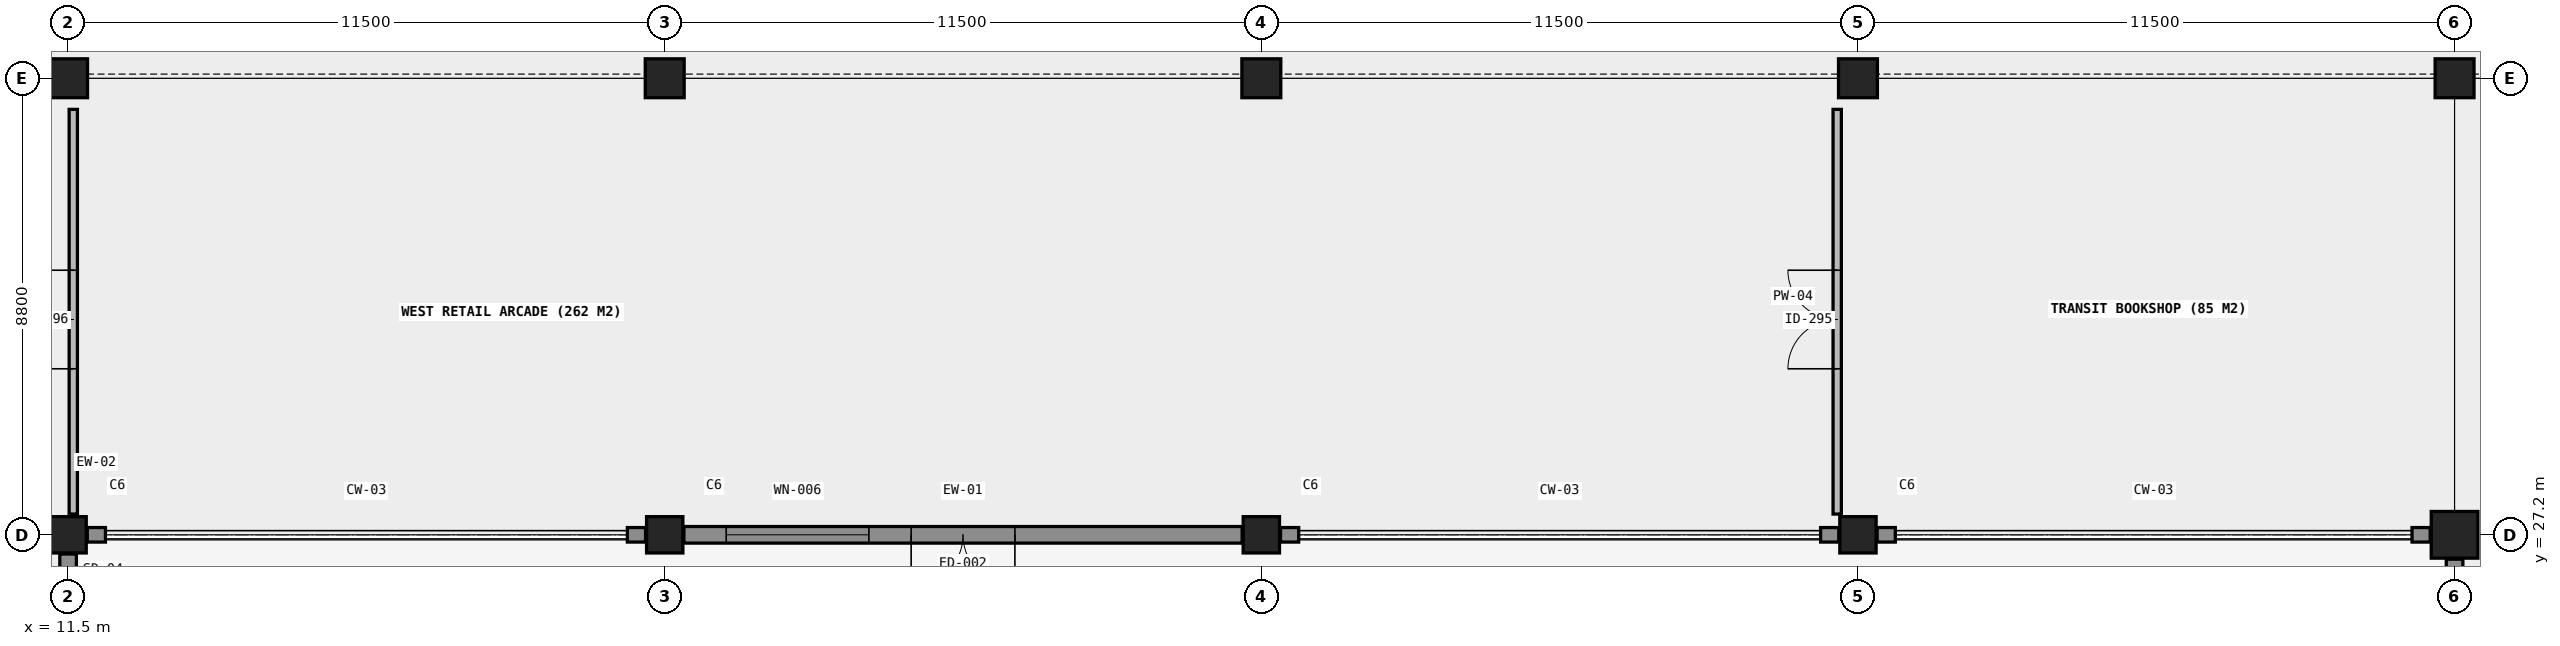
"""IFC4 building model, lengths in metres.
Left out: names, types, materials, properties, quantities, classifications, styles, units other than length and angle.
Written with IfcOpenShell. Run it as: python <this file> out.ifc"""

import sys

from ifc_helpers import new_model, si_unit, direction, frame, frame_2d, origin, origin_2d, place, context, subcontext, project, spatial, rectangle, circle, extrude, element, fill, save


model = new_model("IFC4")
c1 = context("Model", 3, precision=1e-05, world=origin(), true_north=direction((0.0, 1.0)))
c2 = subcontext(c1, "Body", "Model", "MODEL_VIEW")
j1 = project(units=[si_unit("LENGTHUNIT", "METRE"), si_unit("PLANEANGLEUNIT", "RADIAN")], contexts=[c1])
p1 = place(None, origin())
s1 = spatial("IfcSite", under=j1, at=p1, CompositionType="ELEMENT")
p2 = place(p1, origin())
s2 = spatial("IfcBuilding", under=s1, at=p2, CompositionType="ELEMENT")
p3 = place(p2, origin())
s3 = spatial("IfcBuildingStorey", under=s2, at=p3, CompositionType="ELEMENT", Elevation=0.0)
p4 = place(p3, frame((11.5, 27.2, 0.0), z_axis=(0.0, 0.0, 1.0), x_axis=(1.0, 0.0, 0.0)))
e1 = element("IfcColumn", 1, at=p4, inside=s3, PredefinedType="COLUMN", context=c2, shape_type="SweptSolid", body=[
    extrude(rectangle(XDim=0.7, YDim=0.7, at=origin_2d()), origin(), (0.0, 0.0, 1.0), 4.2),
])
p5 = place(p3, frame((11.5, 36.0, 0.0), z_axis=(0.0, 0.0, 1.0), x_axis=(1.0, 0.0, 0.0)))
e2 = element("IfcColumn", 2, at=p5, inside=s3, PredefinedType="COLUMN", context=c2, shape_type="SweptSolid", body=[
    extrude(rectangle(XDim=0.75, YDim=0.75, at=origin_2d()), origin(), (0.0, 0.0, 1.0), 4.2),
])
p6 = place(p3, frame((23.0, 27.2, 0.0), z_axis=(0.0, 0.0, 1.0), x_axis=(1.0, 0.0, 0.0)))
e3 = element("IfcColumn", 3, at=p6, inside=s3, PredefinedType="COLUMN", context=c2, shape_type="SweptSolid", body=[
    extrude(rectangle(XDim=0.7, YDim=0.7, at=origin_2d()), origin(), (0.0, 0.0, 1.0), 4.2),
])
p7 = place(p3, frame((23.0, 36.0, 0.0), z_axis=(0.0, 0.0, 1.0), x_axis=(1.0, 0.0, 0.0)))
e4 = element("IfcColumn", 4, at=p7, inside=s3, PredefinedType="COLUMN", context=c2, shape_type="SweptSolid", body=[
    extrude(rectangle(XDim=0.75, YDim=0.75, at=origin_2d()), origin(), (0.0, 0.0, 1.0), 4.2),
])
p8 = place(p3, frame((34.5, 27.2, 0.0), z_axis=(0.0, 0.0, 1.0), x_axis=(1.0, 0.0, 0.0)))
e5 = element("IfcColumn", 5, at=p8, inside=s3, PredefinedType="COLUMN", context=c2, shape_type="SweptSolid", body=[
    extrude(rectangle(XDim=0.7, YDim=0.7, at=origin_2d()), origin(), (0.0, 0.0, 1.0), 4.2),
])
p9 = place(p3, frame((34.5, 36.0, 0.0), z_axis=(0.0, 0.0, 1.0), x_axis=(1.0, 0.0, 0.0)))
e6 = element("IfcColumn", 6, at=p9, inside=s3, PredefinedType="COLUMN", context=c2, shape_type="SweptSolid", body=[
    extrude(rectangle(XDim=0.75, YDim=0.75, at=origin_2d()), origin(), (0.0, 0.0, 1.0), 4.2),
])
p10 = place(p3, frame((46.0, 27.2, 0.0), z_axis=(0.0, 0.0, 1.0), x_axis=(1.0, 0.0, 0.0)))
e7 = element("IfcColumn", 7, at=p10, inside=s3, PredefinedType="COLUMN", context=c2, shape_type="SweptSolid", body=[
    extrude(rectangle(XDim=0.7, YDim=0.7, at=origin_2d()), origin(), (0.0, 0.0, 1.0), 4.2),
])
p11 = place(p3, frame((46.0, 36.0, 0.0), z_axis=(0.0, 0.0, 1.0), x_axis=(1.0, 0.0, 0.0)))
e8 = element("IfcColumn", 8, at=p11, inside=s3, PredefinedType="COLUMN", context=c2, shape_type="SweptSolid", body=[
    extrude(rectangle(XDim=0.75, YDim=0.75, at=origin_2d()), origin(), (0.0, 0.0, 1.0), 4.2),
])
p12 = place(p3, frame((57.5, 27.2, 0.0), z_axis=(0.0, 0.0, 1.0), x_axis=(1.0, 0.0, 0.0)))
e9 = element("IfcColumn", 9, at=p12, inside=s3, PredefinedType="COLUMN", context=c2, shape_type="SweptSolid", body=[
    extrude(circle(Radius=0.45, at=origin_2d()), origin(), (0.0, 0.0, 1.0), 4.2),
])
p13 = place(p3, frame((57.5, 36.0, 0.0), z_axis=(0.0, 0.0, 1.0), x_axis=(1.0, 0.0, 0.0)))
e10 = element("IfcColumn", 10, at=p13, inside=s3, PredefinedType="COLUMN", context=c2, shape_type="SweptSolid", body=[
    extrude(rectangle(XDim=0.75, YDim=0.75, at=origin_2d()), origin(), (0.0, 0.0, 1.0), 4.2),
])
p14 = place(p3, frame((11.5, 17.97, 0.0), z_axis=(0.0, 0.0, 1.0), x_axis=(0.0, 1.0, 0.0)))
e11 = element("IfcWall", 11, at=p14, inside=s3, PredefinedType="SOLIDWALL", context=c2, shape_type="SweptSolid", body=[
    extrude(rectangle(XDim=8.86, YDim=0.32, at=frame_2d((4.43, 0.0))), origin(), (0.0, 0.0, 1.0), 3.0),
])
p15 = place(p14, frame((1.353, 0.0, 0.84)))
e12 = element("IfcOpeningElement", 12, at=p15, cuts=e11, PredefinedType="OPENING", context=c2, shape_type="SweptSolid", body=[
    extrude(rectangle(XDim=2.4, YDim=2.1, at=frame_2d((1.2, 1.05))), frame((0.0, 0.17, 0.0), z_axis=(0.0, -1.0, 0.0), x_axis=(1.0, 0.0, 0.0)), (0.0, 0.0, 1.0), 0.34),
])
p16 = place(p14, frame((5.107, 0.0, 0.84)))
e13 = element("IfcOpeningElement", 13, at=p16, cuts=e11, PredefinedType="OPENING", context=c2, shape_type="SweptSolid", body=[
    extrude(rectangle(XDim=2.4, YDim=2.1, at=frame_2d((1.2, 1.05))), frame((0.0, 0.17, 0.0), z_axis=(0.0, -1.0, 0.0), x_axis=(1.0, 0.0, 0.0)), (0.0, 0.0, 1.0), 0.34),
])
for number, where, z_axis, x_axis in (
    (14, (11.87, 27.2, 0.0), (0.0, 0.0, 1.0), (1.0, 0.0, 0.0)),
    (15, (22.28, 27.2, 0.0), (0.0, 0.0, 1.0), (1.0, 0.0, 0.0)),
):
    element("IfcWall", number, at=place(p3, frame(where, z_axis=z_axis, x_axis=x_axis)), inside=s3, PredefinedType="SOLIDWALL", context=c2, shape_type="SweptSolid", body=[
        extrude(rectangle(XDim=0.35, YDim=0.28, at=frame_2d((0.175, 0.0))), origin(), (0.0, 0.0, 1.0), 3.88),
    ])
p17 = place(p3, frame((23.37, 27.2, 0.0), z_axis=(0.0, 0.0, 1.0), x_axis=(1.0, 0.0, 0.0)))
e16 = element("IfcWall", 16, at=p17, inside=s3, PredefinedType="SOLIDWALL", context=c2, shape_type="SweptSolid", body=[
    extrude(rectangle(XDim=10.76, YDim=0.32, at=frame_2d((5.38, 0.0))), origin(), (0.0, 0.0, 1.0), 3.0),
])
p18 = place(p17, frame((4.38, 0.0, 0.0)))
e17 = element("IfcOpeningElement", 17, at=p18, cuts=e16, PredefinedType="OPENING", context=c2, shape_type="SweptSolid", body=[
    extrude(rectangle(XDim=2.0, YDim=2.4, at=frame_2d((1.0, 1.2))), frame((0.0, 0.17, 0.0), z_axis=(0.0, -1.0, 0.0), x_axis=(1.0, 0.0, 0.0)), (0.0, 0.0, 1.0), 0.34),
])
p19 = place(p17, frame((0.815, 0.0, 0.78)))
e18 = element("IfcOpeningElement", 18, at=p19, cuts=e16, PredefinedType="OPENING", context=c2, shape_type="SweptSolid", body=[
    extrude(rectangle(XDim=2.75, YDim=2.15, at=frame_2d((1.375, 1.075))), frame((0.0, 0.17, 0.0), z_axis=(0.0, -1.0, 0.0), x_axis=(1.0, 0.0, 0.0)), (0.0, 0.0, 1.0), 0.34),
])
for number, where, z_axis, x_axis in (
    (19, (34.87, 27.2, 0.0), (0.0, 0.0, 1.0), (1.0, 0.0, 0.0)),
    (20, (45.28, 27.2, 0.0), (0.0, 0.0, 1.0), (1.0, 0.0, 0.0)),
    (21, (46.37, 27.2, 0.0), (0.0, 0.0, 1.0), (1.0, 0.0, 0.0)),
):
    element("IfcWall", number, at=place(p3, frame(where, z_axis=z_axis, x_axis=x_axis)), inside=s3, PredefinedType="SOLIDWALL", context=c2, shape_type="SweptSolid", body=[
        extrude(rectangle(XDim=0.35, YDim=0.28, at=frame_2d((0.175, 0.0))), origin(), (0.0, 0.0, 1.0), 3.88),
    ])
p20 = place(p3, frame((56.68, 27.2, 0.0), z_axis=(0.0, 0.0, 1.0), x_axis=(1.0, 0.0, 0.0)))
e22 = element("IfcWall", 22, at=p20, inside=s3, PredefinedType="SOLIDWALL", context=c2, shape_type="SweptSolid", body=[
    extrude(rectangle(XDim=0.35, YDim=0.28, at=frame_2d((0.175, 0.0))), origin(), (0.0, 0.0, 1.0), 3.88),
])
p21 = place(p3, frame((57.5, 18.07, 0.0), z_axis=(0.0, 0.0, 1.0), x_axis=(0.0, 1.0, 0.0)))
e23 = element("IfcWall", 23, at=p21, inside=s3, PredefinedType="SOLIDWALL", context=c2, shape_type="SweptSolid", body=[
    extrude(rectangle(XDim=8.66, YDim=0.32, at=frame_2d((4.33, 0.0))), origin(), (0.0, 0.0, 1.0), 3.0),
])
p22 = place(p21, frame((1.753, 0.0, 0.85)))
e24 = element("IfcOpeningElement", 24, at=p22, cuts=e23, PredefinedType="OPENING", context=c2, shape_type="SweptSolid", body=[
    extrude(rectangle(XDim=1.7, YDim=1.5, at=frame_2d((0.85, 0.75))), frame((0.0, 0.17, 0.0), z_axis=(0.0, -1.0, 0.0), x_axis=(1.0, 0.0, 0.0)), (0.0, 0.0, 1.0), 0.34),
])
p23 = place(p21, frame((5.207, 0.0, 0.85)))
e25 = element("IfcOpeningElement", 25, at=p23, cuts=e23, PredefinedType="OPENING", context=c2, shape_type="SweptSolid", body=[
    extrude(rectangle(XDim=1.7, YDim=1.5, at=frame_2d((0.85, 0.75))), frame((0.0, 0.17, 0.0), z_axis=(0.0, -1.0, 0.0), x_axis=(1.0, 0.0, 0.0)), (0.0, 0.0, 1.0), 0.34),
])
p24 = place(p3, frame((45.6, 27.6, 0.0), z_axis=(0.0, 0.0, 1.0), x_axis=(0.0, 1.0, 0.0)))
e26 = element("IfcWall", 26, at=p24, inside=s3, PredefinedType="PARTITIONING", context=c2, shape_type="SweptSolid", body=[
    extrude(rectangle(XDim=7.8, YDim=0.16, at=frame_2d((3.9, 0.0))), origin(), (0.0, 0.0, 1.0), 3.88),
])
p25 = place(p24, frame((2.8, 0.0, 0.0)))
e27 = element("IfcOpeningElement", 27, at=p25, cuts=e26, PredefinedType="OPENING", context=c2, shape_type="SweptSolid", body=[
    extrude(rectangle(XDim=1.9, YDim=2.35, at=frame_2d((0.95, 1.175))), frame((0.0, 0.09, 0.0), z_axis=(0.0, -1.0, 0.0), x_axis=(1.0, 0.0, 0.0)), (0.0, 0.0, 1.0), 0.18),
])
p26 = place(p3, frame((11.6, 27.6, 0.0), z_axis=(0.0, 0.0, 1.0), x_axis=(0.0, 1.0, 0.0)))
e28 = element("IfcWall", 28, at=p26, inside=s3, PredefinedType="PARTITIONING", context=c2, shape_type="SweptSolid", body=[
    extrude(rectangle(XDim=7.8, YDim=0.16, at=frame_2d((3.9, 0.0))), origin(), (0.0, 0.0, 1.0), 3.0),
])
p27 = place(p26, frame((2.8, 0.0, 0.0)))
e29 = element("IfcOpeningElement", 29, at=p27, cuts=e28, PredefinedType="OPENING", context=c2, shape_type="SweptSolid", body=[
    extrude(rectangle(XDim=1.9, YDim=2.35, at=frame_2d((0.95, 1.175))), frame((0.0, 0.09, 0.0), z_axis=(0.0, -1.0, 0.0), x_axis=(1.0, 0.0, 0.0)), (0.0, 0.0, 1.0), 0.18),
])
p28 = place(p18, frame((1.0, 0.0, 0.0), z_axis=(0.0, 0.0, 1.0), x_axis=(-1.0, 0.0, 0.0)))
e30 = element("IfcDoor", 30, at=p28, inside=s3, OperationType="DOUBLE_DOOR_SINGLE_SWING", PredefinedType="DOOR", context=c2, shape_type="SweptSolid", body=[
    extrude(rectangle(XDim=2.0, YDim=2.4, at=frame_2d((0.0, 1.2))), frame((0.0, 0.025, 0.0), z_axis=(0.0, -1.0, 0.0), x_axis=(1.0, 0.0, 0.0)), (0.0, 0.0, 1.0), 0.05),
])
fill(e17, e30)
p29 = place(p19, origin())
e31 = element("IfcWindow", 31, at=p29, inside=s3, PartitioningType="SINGLE_PANEL", PredefinedType="WINDOW", context=c2, shape_type="SweptSolid", body=[
    extrude(rectangle(XDim=2.75, YDim=2.15, at=frame_2d((1.375, 1.075))), frame((0.0, 0.03, 0.0), z_axis=(0.0, -1.0, 0.0), x_axis=(1.0, 0.0, 0.0)), (0.0, 0.0, 1.0), 0.06),
])
fill(e18, e31)
p30 = place(p25, origin())
e32 = element("IfcDoor", 32, at=p30, inside=s3, OperationType="DOUBLE_DOOR_SINGLE_SWING", PredefinedType="DOOR", context=c2, shape_type="SweptSolid", body=[
    extrude(rectangle(XDim=1.9, YDim=2.35, at=frame_2d((0.95, 1.175))), frame((0.0, 0.025, 0.0), z_axis=(0.0, -1.0, 0.0), x_axis=(1.0, 0.0, 0.0)), (0.0, 0.0, 1.0), 0.05),
])
fill(e27, e32)
p31 = place(p27, origin())
e33 = element("IfcDoor", 33, at=p31, inside=s3, OperationType="DOUBLE_DOOR_SINGLE_SWING", PredefinedType="DOOR", context=c2, shape_type="SweptSolid", body=[
    extrude(rectangle(XDim=1.9, YDim=2.35, at=frame_2d((0.95, 1.175))), frame((0.0, 0.025, 0.0), z_axis=(0.0, -1.0, 0.0), x_axis=(1.0, 0.0, 0.0)), (0.0, 0.0, 1.0), 0.05),
])
fill(e29, e33)
save(model, sys.argv[1])
